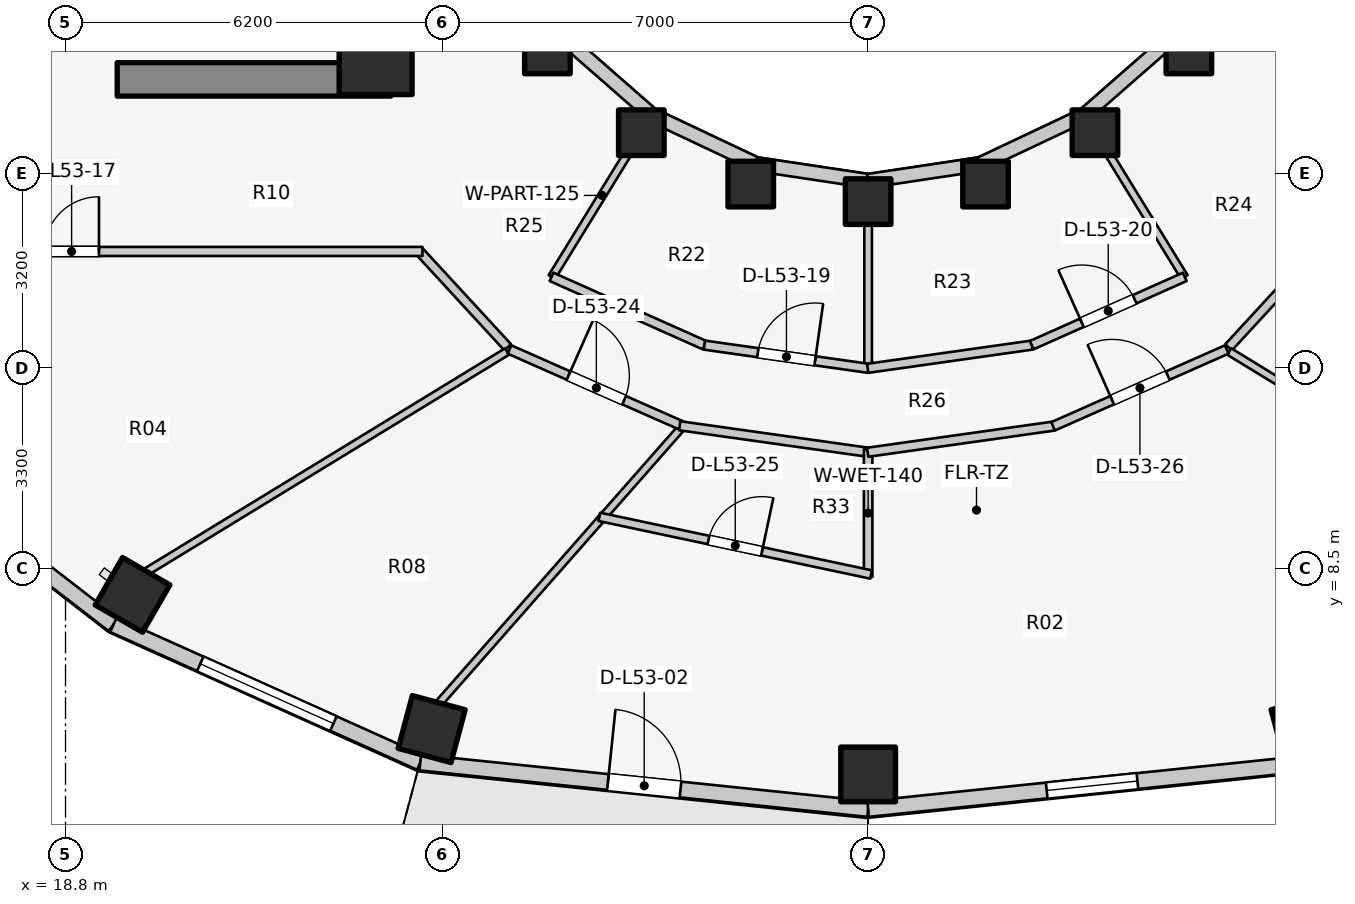
"""IFC4 building model, lengths in metres.
Left out: names, types, materials, properties, quantities, classifications, styles, units other than length and angle.
Written with IfcOpenShell. Run it as: python <this file> out.ifc"""

import sys

from ifc_helpers import new_model, si_unit, direction, frame, frame_2d, origin, origin_2d, place, context, subcontext, project, spatial, rectangle, extrude, element, fill, save


model = new_model("IFC4")
c1 = context("Model", 3, precision=1e-05, world=origin(), true_north=direction((0.0, 1.0)))
c2 = subcontext(c1, "Body", "Model", "MODEL_VIEW")
j1 = project(units=[si_unit("LENGTHUNIT", "METRE"), si_unit("PLANEANGLEUNIT", "RADIAN")], contexts=[c1])
p1 = place(None, origin())
s1 = spatial("IfcSite", under=j1, at=p1, CompositionType="ELEMENT")
p2 = place(p1, origin())
s2 = spatial("IfcBuilding", under=s1, at=p2, CompositionType="ELEMENT")
p3 = place(p2, frame((0.0, 0.0, 174.6)))
s3 = spatial("IfcBuildingStorey", under=s2, at=p3, CompositionType="ELEMENT", Elevation=174.6)
p4 = place(p3, frame((19.65, 16.55, 0.0), z_axis=(0.0, 0.0, 1.0), x_axis=(1.0, 0.0, 0.0)))
e1 = element("IfcWall", 1, at=p4, inside=s3, PredefinedType="SHEAR", context=c2, shape_type="SweptSolid", body=[
    extrude(rectangle(XDim=4.5, YDim=0.55, at=frame_2d((2.25, 0.0))), origin(), (0.0, 0.0, 1.0), 3.1),
])
p5 = place(p3, frame((23.9, 16.9, 0.0), z_axis=(0.0, 0.0, 1.0), x_axis=(1.0, 0.0, 0.0)))
e2 = element("IfcColumn", 2, at=p5, inside=s3, PredefinedType="COLUMN", context=c2, shape_type="SweptSolid", body=[
    extrude(rectangle(XDim=1.2, YDim=1.2, at=origin_2d()), origin(), (0.0, 0.0, 1.0), 3.1),
])
for number, where, z_axis, x_axis in (
    (3, (26.725, 17.018, 0.0), (0.0, 0.0, 1.0), (1.0, 0.0, 0.0)),
    (4, (28.27, 15.673, 0.0), (0.0, 0.0, 1.0), (1.0, 0.0, 0.0)),
):
    element("IfcColumn", number, at=place(p3, frame(where, z_axis=z_axis, x_axis=x_axis)), inside=s3, PredefinedType="COLUMN", context=c2, shape_type="SweptSolid", body=[
        extrude(rectangle(XDim=0.75, YDim=0.75, at=origin_2d()), origin(), (0.0, 0.0, 1.0), 3.1),
    ])
p6 = place(p3, frame((19.902, 8.072, 0.0), z_axis=(0.0, 0.0, 1.0), x_axis=(-0.5, -0.866025403784, 0.0)))
e5 = element("IfcColumn", 5, at=p6, inside=s3, PredefinedType="COLUMN", context=c2, shape_type="SweptSolid", body=[
    extrude(rectangle(XDim=0.9, YDim=0.9, at=origin_2d()), origin(), (0.0, 0.0, 1.0), 3.1),
])
p7 = place(p3, frame((30.069, 14.828, 0.0), z_axis=(0.0, 0.0, 1.0), x_axis=(1.0, 0.0, 0.0)))
e6 = element("IfcColumn", 6, at=p7, inside=s3, PredefinedType="COLUMN", context=c2, shape_type="SweptSolid", body=[
    extrude(rectangle(XDim=0.75, YDim=0.75, at=origin_2d()), origin(), (0.0, 0.0, 1.0), 3.1),
])
p8 = place(p3, frame((24.822, 5.865, 0.0), z_axis=(0.0, 0.0, 1.0), x_axis=(-0.258819045103, -0.965925826289, 0.0)))
e7 = element("IfcColumn", 7, at=p8, inside=s3, PredefinedType="COLUMN", context=c2, shape_type="SweptSolid", body=[
    extrude(rectangle(XDim=0.9, YDim=0.9, at=origin_2d()), origin(), (0.0, 0.0, 1.0), 3.1),
])
p9 = place(p3, frame((32.0, 14.54, 0.0), z_axis=(0.0, 0.0, 1.0), x_axis=(1.0, 0.0, 0.0)))
e8 = element("IfcColumn", 8, at=p9, inside=s3, PredefinedType="COLUMN", context=c2, shape_type="SweptSolid", body=[
    extrude(rectangle(XDim=0.75, YDim=0.75, at=origin_2d()), origin(), (0.0, 0.0, 1.0), 3.1),
])
p10 = place(p3, frame((32.0, 5.12, 0.0), z_axis=(0.0, 0.0, 1.0), x_axis=(0.0, -1.0, 0.0)))
e9 = element("IfcColumn", 9, at=p10, inside=s3, PredefinedType="COLUMN", context=c2, shape_type="SweptSolid", body=[
    extrude(rectangle(XDim=0.9, YDim=0.9, at=origin_2d()), origin(), (0.0, 0.0, 1.0), 3.1),
])
p11 = place(p3, frame((33.931, 14.828, 0.0), z_axis=(0.0, 0.0, 1.0), x_axis=(1.0, 0.0, 0.0)))
e10 = element("IfcColumn", 10, at=p11, inside=s3, PredefinedType="COLUMN", context=c2, shape_type="SweptSolid", body=[
    extrude(rectangle(XDim=0.75, YDim=0.75, at=origin_2d()), origin(), (0.0, 0.0, 1.0), 3.1),
])
p12 = place(p3, frame((39.178, 5.865, 0.0), z_axis=(0.0, 0.0, 1.0), x_axis=(0.258819045103, -0.965925826289, 0.0)))
e11 = element("IfcColumn", 11, at=p12, inside=s3, PredefinedType="COLUMN", context=c2, shape_type="SweptSolid", body=[
    extrude(rectangle(XDim=0.9, YDim=0.9, at=origin_2d()), origin(), (0.0, 0.0, 1.0), 3.1),
])
for number, where, z_axis, x_axis in (
    (12, (35.73, 15.673, 0.0), (0.0, 0.0, 1.0), (1.0, 0.0, 0.0)),
    (13, (37.275, 17.018, 0.0), (0.0, 0.0, 1.0), (1.0, 0.0, 0.0)),
):
    element("IfcColumn", number, at=place(p3, frame(where, z_axis=z_axis, x_axis=x_axis)), inside=s3, PredefinedType="COLUMN", context=c2, shape_type="SweptSolid", body=[
        extrude(rectangle(XDim=0.75, YDim=0.75, at=origin_2d()), origin(), (0.0, 0.0, 1.0), 3.1),
    ])
p13 = place(p3, frame((26.965, 17.258, 0.0), z_axis=(0.0, 0.0, 1.0), x_axis=(0.752576694707, -0.658504607869, 0.0)))
e14 = element("IfcWall", 14, at=p13, inside=s3, PredefinedType="STANDARD", context=c2, shape_type="SweptSolid", body=[
    extrude(rectangle(XDim=1.959, YDim=0.23, at=frame_2d((0.98, 0.0))), origin(), (0.0, 0.0, 1.0), 2.16),
])
p14 = place(p3, frame((28.44, 15.968, 0.0), z_axis=(0.0, 0.0, 1.0), x_axis=(0.904179699603, -0.427152280606, 0.0)))
e15 = element("IfcWall", 15, at=p14, inside=s3, PredefinedType="STANDARD", context=c2, shape_type="SweptSolid", body=[
    extrude(rectangle(XDim=1.899, YDim=0.23, at=frame_2d((0.95, 0.0))), origin(), (0.0, 0.0, 1.0), 2.16),
])
for number, where, z_axis, x_axis in (
    (16, (30.157, 15.157, 0.0), (0.0, 0.0, 1.0), (0.989, -0.149, 0.0)),
    (17, (32.0, 14.88, 0.0), (0.0, 0.0, 1.0), (0.989, 0.149, 0.0)),
):
    element("IfcWall", number, at=place(p3, frame(where, z_axis=z_axis, x_axis=x_axis)), inside=s3, PredefinedType="STANDARD", context=c2, shape_type="SweptSolid", body=[
        extrude(rectangle(XDim=1.864, YDim=0.23, at=frame_2d((0.932, 0.0))), origin(), (0.0, 0.0, 1.0), 2.16),
    ])
p15 = place(p3, frame((33.843, 15.157, 0.0), z_axis=(0.0, 0.0, 1.0), x_axis=(0.904179699603, 0.427152280606, 0.0)))
e18 = element("IfcWall", 18, at=p15, inside=s3, PredefinedType="STANDARD", context=c2, shape_type="SweptSolid", body=[
    extrude(rectangle(XDim=1.899, YDim=0.23, at=frame_2d((0.95, 0.0))), origin(), (0.0, 0.0, 1.0), 2.16),
])
p16 = place(p3, frame((35.56, 15.968, 0.0), z_axis=(0.0, 0.0, 1.0), x_axis=(0.752576694707, 0.658504607869, 0.0)))
e19 = element("IfcWall", 19, at=p16, inside=s3, PredefinedType="STANDARD", context=c2, shape_type="SweptSolid", body=[
    extrude(rectangle(XDim=1.959, YDim=0.23, at=frame_2d((0.98, 0.0))), origin(), (0.0, 0.0, 1.0), 2.16),
])
p17 = place(p3, frame((15.731, 10.559, 0.0), z_axis=(0.0, 0.0, 1.0), x_axis=(0.791460185804, -0.611220724687, 0.0)))
e20 = element("IfcWall", 20, at=p17, inside=s3, PredefinedType="STANDARD", context=c2, shape_type="SweptSolid", body=[
    extrude(rectangle(XDim=4.872, YDim=0.26, at=frame_2d((2.436, 0.0))), origin(), (0.0, 0.0, 1.0), 2.85),
])
p18 = place(p3, frame((19.587, 7.581, 0.0), z_axis=(0.0, 0.0, 1.0), x_axis=(0.912353637112, -0.409403029847, 0.0)))
e21 = element("IfcWall", 21, at=p18, inside=s3, PredefinedType="STANDARD", context=c2, shape_type="SweptSolid", body=[
    extrude(rectangle(XDim=5.533, YDim=0.26, at=frame_2d((2.766, 0.0))), origin(), (0.0, 0.0, 1.0), 2.85),
])
p19 = place(p18, frame((1.566, 0.0, 0.75)))
e22 = element("IfcOpeningElement", 22, at=p19, cuts=e21, PredefinedType="OPENING", context=c2, shape_type="SweptSolid", body=[
    extrude(rectangle(XDim=2.4, YDim=1.7, at=frame_2d((1.2, 0.85))), frame((0.0, 0.14, 0.0), z_axis=(0.0, -1.0, 0.0), x_axis=(1.0, 0.0, 0.0)), (0.0, 0.0, 1.0), 0.28),
])
p20 = place(p3, frame((24.635, 5.315, 0.0), z_axis=(0.0, 0.0, 1.0), x_axis=(0.994664178965, -0.10316574569, 0.0)))
e23 = element("IfcWall", 23, at=p20, inside=s3, PredefinedType="STANDARD", context=c2, shape_type="SweptSolid", body=[
    extrude(rectangle(XDim=7.405, YDim=0.26, at=frame_2d((3.702, 0.0))), origin(), (0.0, 0.0, 1.0), 2.88),
])
p21 = place(p20, frame((3.102, 0.0, 0.0)))
e24 = element("IfcOpeningElement", 24, at=p21, cuts=e23, PredefinedType="OPENING", context=c2, shape_type="SweptSolid", body=[
    extrude(rectangle(XDim=1.2, YDim=2.2, at=frame_2d((0.6, 1.1))), frame((0.0, 0.14, 0.0), z_axis=(0.0, -1.0, 0.0), x_axis=(1.0, 0.0, 0.0)), (0.0, 0.0, 1.0), 0.28),
])
p22 = place(p3, frame((32.0, 4.552, 0.0), z_axis=(0.0, 0.0, 1.0), x_axis=(0.994664178965, 0.10316574569, 0.0)))
e25 = element("IfcWall", 25, at=p22, inside=s3, PredefinedType="STANDARD", context=c2, shape_type="SweptSolid", body=[
    extrude(rectangle(XDim=7.405, YDim=0.26, at=frame_2d((3.702, 0.0))), origin(), (0.0, 0.0, 1.0), 2.85),
])
p23 = place(p22, frame((2.952, 0.0, 0.75)))
e26 = element("IfcOpeningElement", 26, at=p23, cuts=e25, PredefinedType="OPENING", context=c2, shape_type="SweptSolid", body=[
    extrude(rectangle(XDim=1.5, YDim=1.6, at=frame_2d((0.75, 0.8))), frame((0.0, 0.14, 0.0), z_axis=(0.0, -1.0, 0.0), x_axis=(1.0, 0.0, 0.0)), (0.0, 0.0, 1.0), 0.28),
])
p24 = place(p3, frame((26.072, 12.144, 0.0), z_axis=(0.0, 0.0, 1.0), x_axis=(-0.677579737957, 0.735449317567, 0.0)))
e27 = element("IfcWall", 27, at=p24, inside=s3, PredefinedType="PARTITIONING", context=c2, shape_type="SweptSolid", body=[
    extrude(rectangle(XDim=2.173, YDim=0.15, at=frame_2d((1.086, 0.0))), origin(), (0.0, 0.0, 1.0), 2.299),
])
p25 = place(p3, frame((17.15, 13.72, 0.0), z_axis=(0.0, 0.0, 1.0), x_axis=(1.0, 0.0, 0.0)))
e28 = element("IfcWall", 28, at=p25, inside=s3, PredefinedType="PARTITIONING", context=c2, shape_type="SweptSolid", body=[
    extrude(rectangle(XDim=7.52, YDim=0.15, at=frame_2d((3.76, 0.0))), origin(), (0.0, 0.0, 1.0), 2.299),
])
p26 = place(p25, frame((1.3, 0.0, 0.0)))
e29 = element("IfcOpeningElement", 29, at=p26, cuts=e28, PredefinedType="OPENING", context=c2, shape_type="SweptSolid", body=[
    extrude(rectangle(XDim=0.9, YDim=2.1, at=frame_2d((0.45, 1.05))), frame((0.0, 0.085, 0.0), z_axis=(0.0, -1.0, 0.0), x_axis=(1.0, 0.0, 0.0)), (0.0, 0.0, 1.0), 0.17),
])
p27 = place(p3, frame((37.928, 12.144, 0.0), z_axis=(0.0, 0.0, 1.0), x_axis=(0.677579737957, 0.735449317567, 0.0)))
e30 = element("IfcWall", 30, at=p27, inside=s3, PredefinedType="PARTITIONING", context=c2, shape_type="SweptSolid", body=[
    extrude(rectangle(XDim=2.173, YDim=0.15, at=frame_2d((1.086, 0.0))), origin(), (0.0, 0.0, 1.0), 2.299),
])
p28 = place(p3, frame((28.45, 15.985, 0.0), z_axis=(0.0, 0.0, 1.0), x_axis=(-0.523587550846, -0.851971875474, 0.0)))
e31 = element("IfcWall", 31, at=p28, inside=s3, PredefinedType="PARTITIONING", context=c2, shape_type="SweptSolid", body=[
    extrude(rectangle(XDim=3.153, YDim=0.125, at=frame_2d((1.577, 0.0))), origin(), (0.0, 0.0, 1.0), 2.299),
])
p29 = place(p3, frame((32.0, 14.9, 0.0), z_axis=(0.0, 0.0, 1.0), x_axis=(0.0, -1.0, 0.0)))
e32 = element("IfcWall", 32, at=p29, inside=s3, PredefinedType="PARTITIONING", context=c2, shape_type="SweptSolid", body=[
    extrude(rectangle(XDim=3.102, YDim=0.125, at=frame_2d((1.551, 0.0))), origin(), (0.0, 0.0, 1.0), 2.299),
])
p30 = place(p3, frame((35.55, 15.985, 0.0), z_axis=(0.0, 0.0, 1.0), x_axis=(0.523587550846, -0.851971875474, 0.0)))
e33 = element("IfcWall", 33, at=p30, inside=s3, PredefinedType="PARTITIONING", context=c2, shape_type="SweptSolid", body=[
    extrude(rectangle(XDim=3.153, YDim=0.125, at=frame_2d((1.577, 0.0))), origin(), (0.0, 0.0, 1.0), 2.299),
])
p31 = place(p3, frame((26.793, 13.303, 0.0), z_axis=(0.0, 0.0, 1.0), x_axis=(0.913145536541, -0.407633694749, 0.0)))
e34 = element("IfcWall", 34, at=p31, inside=s3, PredefinedType="PARTITIONING", context=c2, shape_type="SweptSolid", body=[
    extrude(rectangle(XDim=2.756, YDim=0.15, at=frame_2d((1.378, 0.0))), origin(), (0.0, 0.0, 1.0), 2.299),
])
p32 = place(p3, frame((29.306, 12.18, 0.0), z_axis=(0.0, 0.0, 1.0), x_axis=(0.990145400278, -0.140043158738, 0.0)))
e35 = element("IfcWall", 35, at=p32, inside=s3, PredefinedType="PARTITIONING", context=c2, shape_type="SweptSolid", body=[
    extrude(rectangle(XDim=2.728, YDim=0.15, at=frame_2d((1.364, 0.0))), origin(), (0.0, 0.0, 1.0), 2.299),
])
p33 = place(p32, frame((0.889, 0.0, 0.0)))
e36 = element("IfcOpeningElement", 36, at=p33, cuts=e35, PredefinedType="OPENING", context=c2, shape_type="SweptSolid", body=[
    extrude(rectangle(XDim=0.95, YDim=2.1, at=frame_2d((0.475, 1.05))), frame((0.0, 0.085, 0.0), z_axis=(0.0, -1.0, 0.0), x_axis=(1.0, 0.0, 0.0)), (0.0, 0.0, 1.0), 0.17),
])
p34 = place(p3, frame((31.993, 11.798, 0.0), z_axis=(0.0, 0.0, 1.0), x_axis=(0.990145400278, 0.140043158738, 0.0)))
e37 = element("IfcWall", 37, at=p34, inside=s3, PredefinedType="PARTITIONING", context=c2, shape_type="SweptSolid", body=[
    extrude(rectangle(XDim=2.728, YDim=0.15, at=frame_2d((1.364, 0.0))), origin(), (0.0, 0.0, 1.0), 2.299),
])
p35 = place(p3, frame((34.69, 12.179, 0.0), z_axis=(0.0, 0.0, 1.0), x_axis=(0.913145536541, 0.407633694749, 0.0)))
e38 = element("IfcWall", 38, at=p35, inside=s3, PredefinedType="PARTITIONING", context=c2, shape_type="SweptSolid", body=[
    extrude(rectangle(XDim=2.756, YDim=0.15, at=frame_2d((1.378, 0.0))), origin(), (0.0, 0.0, 1.0), 2.299),
])
p36 = place(p35, frame((0.903, 0.0, 0.0)))
e39 = element("IfcOpeningElement", 39, at=p36, cuts=e38, PredefinedType="OPENING", context=c2, shape_type="SweptSolid", body=[
    extrude(rectangle(XDim=0.95, YDim=2.1, at=frame_2d((0.475, 1.05))), frame((0.0, 0.085, 0.0), z_axis=(0.0, -1.0, 0.0), x_axis=(1.0, 0.0, 0.0)), (0.0, 0.0, 1.0), 0.17),
])
p37 = place(p3, frame((26.062, 12.075, 0.0), z_axis=(0.0, 0.0, 1.0), x_axis=(-0.853440334679, -0.521190555501, 0.0)))
e40 = element("IfcWall", 40, at=p37, inside=s3, PredefinedType="PARTITIONING", context=c2, shape_type="SweptSolid", body=[
    extrude(rectangle(XDim=6.966, YDim=0.125, at=frame_2d((3.483, 0.0))), origin(), (0.0, 0.0, 1.0), 2.299),
])
p38 = place(p3, frame((28.914, 10.805, 0.0), z_axis=(0.0, 0.0, 1.0), x_axis=(-0.660581320981, -0.750754499401, 0.0)))
e41 = element("IfcWall", 41, at=p38, inside=s3, PredefinedType="PARTITIONING", context=c2, shape_type="SweptSolid", body=[
    extrude(rectangle(XDim=6.027, YDim=0.125, at=frame_2d((3.013, 0.0))), origin(), (0.0, 0.0, 1.0), 2.299),
])
p39 = place(p3, frame((37.938, 12.075, 0.0), z_axis=(0.0, 0.0, 1.0), x_axis=(0.853440334679, -0.521190555501, 0.0)))
e42 = element("IfcWall", 42, at=p39, inside=s3, PredefinedType="PARTITIONING", context=c2, shape_type="SweptSolid", body=[
    extrude(rectangle(XDim=6.966, YDim=0.125, at=frame_2d((3.483, 0.0))), origin(), (0.0, 0.0, 1.0), 2.299),
])
p40 = place(p3, frame((26.102, 12.108, 0.0), z_axis=(0.0, 0.0, 1.0), x_axis=(0.914519212393, -0.40454247016, 0.0)))
e43 = element("IfcWall", 43, at=p40, inside=s3, PredefinedType="PARTITIONING", context=c2, shape_type="SweptSolid", body=[
    extrude(rectangle(XDim=3.124, YDim=0.15, at=frame_2d((1.562, 0.0))), origin(), (0.0, 0.0, 1.0), 2.299),
])
p41 = place(p40, frame((1.062, 0.0, 0.0)))
e44 = element("IfcOpeningElement", 44, at=p41, cuts=e43, PredefinedType="OPENING", context=c2, shape_type="SweptSolid", body=[
    extrude(rectangle(XDim=1.0, YDim=2.1, at=frame_2d((0.5, 1.05))), frame((0.0, 0.085, 0.0), z_axis=(0.0, -1.0, 0.0), x_axis=(1.0, 0.0, 0.0)), (0.0, 0.0, 1.0), 0.17),
])
p42 = place(p3, frame((28.901, 10.854, 0.0), z_axis=(0.0, 0.0, 1.0), x_axis=(0.990251283702, -0.139292480508, 0.0)))
e45 = element("IfcWall", 45, at=p42, inside=s3, PredefinedType="PARTITIONING", context=c2, shape_type="SweptSolid", body=[
    extrude(rectangle(XDim=3.179, YDim=0.15, at=frame_2d((1.59, 0.0))), origin(), (0.0, 0.0, 1.0), 2.299),
])
p43 = place(p3, frame((32.0, 10.468, 0.0), z_axis=(0.0, 0.0, 1.0), x_axis=(0.0, -1.0, 0.0)))
e46 = element("IfcWall", 46, at=p43, inside=s3, PredefinedType="PLUMBINGWALL", context=c2, shape_type="SweptSolid", body=[
    extrude(rectangle(XDim=2.1, YDim=0.14, at=frame_2d((1.05, 0.0))), origin(), (0.0, 0.0, 1.0), 2.299),
])
p44 = place(p3, frame((27.581, 9.356, 0.0), z_axis=(0.0, 0.0, 1.0), x_axis=(0.978225905005, -0.20754295646, 0.0)))
e47 = element("IfcWall", 47, at=p44, inside=s3, PredefinedType="PLUMBINGWALL", context=c2, shape_type="SweptSolid", body=[
    extrude(rectangle(XDim=4.568, YDim=0.14, at=frame_2d((2.284, 0.0))), origin(), (0.0, 0.0, 1.0), 2.299),
])
p45 = place(p44, frame((1.834, 0.0, 0.0)))
e48 = element("IfcOpeningElement", 48, at=p45, cuts=e47, PredefinedType="OPENING", context=c2, shape_type="SweptSolid", body=[
    extrude(rectangle(XDim=0.9, YDim=2.1, at=frame_2d((0.45, 1.05))), frame((0.0, 0.08, 0.0), z_axis=(0.0, -1.0, 0.0), x_axis=(1.0, 0.0, 0.0)), (0.0, 0.0, 1.0), 0.16),
])
p46 = place(p3, frame((31.992, 10.418, 0.0), z_axis=(0.0, 0.0, 1.0), x_axis=(0.990254709652, 0.13926812274, 0.0)))
e49 = element("IfcWall", 49, at=p46, inside=s3, PredefinedType="PARTITIONING", context=c2, shape_type="SweptSolid", body=[
    extrude(rectangle(XDim=3.096, YDim=0.15, at=frame_2d((1.548, 0.0))), origin(), (0.0, 0.0, 1.0), 2.299),
])
p47 = place(p3, frame((35.042, 10.844, 0.0), z_axis=(0.0, 0.0, 1.0), x_axis=(0.914519212393, 0.40454247016, 0.0)))
e50 = element("IfcWall", 50, at=p47, inside=s3, PredefinedType="PARTITIONING", context=c2, shape_type="SweptSolid", body=[
    extrude(rectangle(XDim=3.124, YDim=0.15, at=frame_2d((1.562, 0.0))), origin(), (0.0, 0.0, 1.0), 2.299),
])
p48 = place(p47, frame((1.062, 0.0, 0.0)))
e51 = element("IfcOpeningElement", 51, at=p48, cuts=e50, PredefinedType="OPENING", context=c2, shape_type="SweptSolid", body=[
    extrude(rectangle(XDim=1.0, YDim=2.1, at=frame_2d((0.5, 1.05))), frame((0.0, 0.085, 0.0), z_axis=(0.0, -1.0, 0.0), x_axis=(1.0, 0.0, 0.0)), (0.0, 0.0, 1.0), 0.17),
])
p49 = place(p19, origin())
e52 = element("IfcWindow", 52, at=p49, inside=s3, PartitioningType="SINGLE_PANEL", PredefinedType="WINDOW", context=c2, shape_type="SweptSolid", body=[
    extrude(rectangle(XDim=2.4, YDim=1.7, at=frame_2d((1.2, 0.85))), frame((0.0, 0.03, 0.0), z_axis=(0.0, -1.0, 0.0), x_axis=(1.0, 0.0, 0.0)), (0.0, 0.0, 1.0), 0.06),
])
fill(e22, e52)
p50 = place(p21, origin())
e53 = element("IfcDoor", 53, at=p50, inside=s3, OperationType="SINGLE_SWING_LEFT", PredefinedType="DOOR", context=c2, shape_type="SweptSolid", body=[
    extrude(rectangle(XDim=1.2, YDim=2.2, at=frame_2d((0.6, 1.1))), frame((0.0, 0.025, 0.0), z_axis=(0.0, -1.0, 0.0), x_axis=(1.0, 0.0, 0.0)), (0.0, 0.0, 1.0), 0.05),
])
fill(e24, e53)
p51 = place(p23, origin())
e54 = element("IfcWindow", 54, at=p51, inside=s3, PartitioningType="SINGLE_PANEL", PredefinedType="WINDOW", context=c2, shape_type="SweptSolid", body=[
    extrude(rectangle(XDim=1.5, YDim=1.6, at=frame_2d((0.75, 0.8))), frame((0.0, 0.03, 0.0), z_axis=(0.0, -1.0, 0.0), x_axis=(1.0, 0.0, 0.0)), (0.0, 0.0, 1.0), 0.06),
])
fill(e26, e54)
p52 = place(p26, origin())
e55 = element("IfcDoor", 55, at=p52, inside=s3, OperationType="SINGLE_SWING_RIGHT", PredefinedType="DOOR", context=c2, shape_type="SweptSolid", body=[
    extrude(rectangle(XDim=0.9, YDim=2.1, at=frame_2d((0.45, 1.05))), frame((0.0, 0.025, 0.0), z_axis=(0.0, -1.0, 0.0), x_axis=(1.0, 0.0, 0.0)), (0.0, 0.0, 1.0), 0.05),
])
fill(e29, e55)
p53 = place(p33, origin())
e56 = element("IfcDoor", 56, at=p53, inside=s3, OperationType="SINGLE_SWING_RIGHT", PredefinedType="DOOR", context=c2, shape_type="SweptSolid", body=[
    extrude(rectangle(XDim=0.95, YDim=2.1, at=frame_2d((0.475, 1.05))), frame((0.0, 0.025, 0.0), z_axis=(0.0, -1.0, 0.0), x_axis=(1.0, 0.0, 0.0)), (0.0, 0.0, 1.0), 0.05),
])
fill(e36, e56)
p54 = place(p36, origin())
e57 = element("IfcDoor", 57, at=p54, inside=s3, OperationType="SINGLE_SWING_LEFT", PredefinedType="DOOR", context=c2, shape_type="SweptSolid", body=[
    extrude(rectangle(XDim=0.95, YDim=2.1, at=frame_2d((0.475, 1.05))), frame((0.0, 0.025, 0.0), z_axis=(0.0, -1.0, 0.0), x_axis=(1.0, 0.0, 0.0)), (0.0, 0.0, 1.0), 0.05),
])
fill(e39, e57)
p55 = place(p41, origin())
e58 = element("IfcDoor", 58, at=p55, inside=s3, OperationType="SINGLE_SWING_LEFT", PredefinedType="DOOR", context=c2, shape_type="SweptSolid", body=[
    extrude(rectangle(XDim=1.0, YDim=2.1, at=frame_2d((0.5, 1.05))), frame((0.0, 0.025, 0.0), z_axis=(0.0, -1.0, 0.0), x_axis=(1.0, 0.0, 0.0)), (0.0, 0.0, 1.0), 0.05),
])
fill(e44, e58)
p56 = place(p45, origin())
e59 = element("IfcDoor", 59, at=p56, inside=s3, OperationType="SINGLE_SWING_RIGHT", PredefinedType="DOOR", context=c2, shape_type="SweptSolid", body=[
    extrude(rectangle(XDim=0.9, YDim=2.1, at=frame_2d((0.45, 1.05))), frame((0.0, 0.025, 0.0), z_axis=(0.0, -1.0, 0.0), x_axis=(1.0, 0.0, 0.0)), (0.0, 0.0, 1.0), 0.05),
])
fill(e48, e59)
p57 = place(p48, origin())
e60 = element("IfcDoor", 60, at=p57, inside=s3, OperationType="SINGLE_SWING_LEFT", PredefinedType="DOOR", context=c2, shape_type="SweptSolid", body=[
    extrude(rectangle(XDim=1.0, YDim=2.1, at=frame_2d((0.5, 1.05))), frame((0.0, 0.025, 0.0), z_axis=(0.0, -1.0, 0.0), x_axis=(1.0, 0.0, 0.0)), (0.0, 0.0, 1.0), 0.05),
])
fill(e51, e60)
save(model, sys.argv[1])
